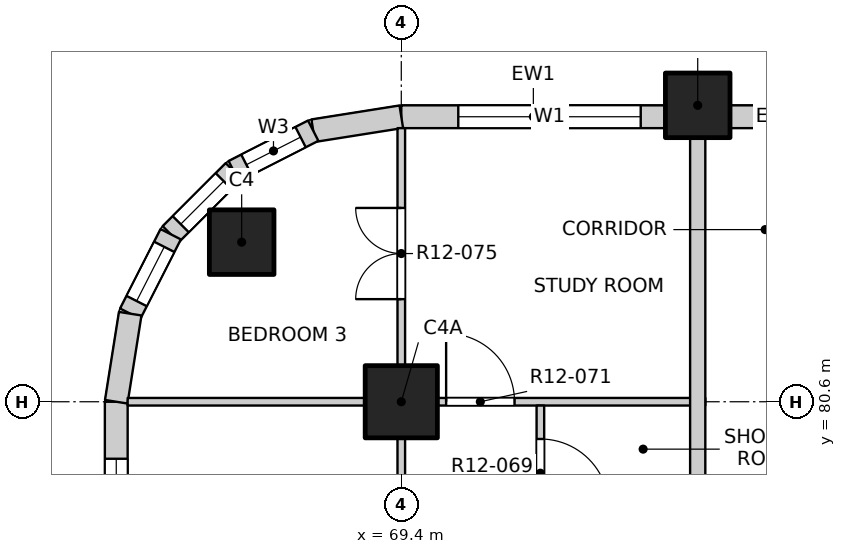
"""IFC4 building model, lengths in metres.
Left out: names, types, materials, properties, quantities, classifications, styles, units other than length and angle.
Written with IfcOpenShell. Run it as: python <this file> out.ifc"""

import sys

from ifc_helpers import new_model, si_unit, direction, frame, frame_2d, origin, origin_2d, place, context, subcontext, project, spatial, rectangle, extrude, element, fill, save


model = new_model("IFC4")
c1 = context("Model", 3, precision=1e-05, world=origin(), true_north=direction((0.0, 1.0)))
c2 = subcontext(c1, "Body", "Model", "MODEL_VIEW")
j1 = project(units=[si_unit("LENGTHUNIT", "METRE"), si_unit("PLANEANGLEUNIT", "RADIAN")], contexts=[c1])
p1 = place(None, origin())
s1 = spatial("IfcSite", under=j1, at=p1, CompositionType="ELEMENT")
p2 = place(p1, origin())
s2 = spatial("IfcBuilding", under=s1, at=p2, CompositionType="ELEMENT")
p3 = place(p2, frame((0.0, 0.0, 137.3)))
s3 = spatial("IfcBuildingStorey", under=s2, at=p3, CompositionType="ELEMENT", Elevation=137.3)
for number, where, z_axis, x_axis in (
    (1, (67.3, 82.7, -0.25), (0.0, 0.0, 1.0), (1.0, 0.0, 0.0)),
    (2, (73.3, 84.5, -0.25), (0.0, 0.0, 1.0), (1.0, 0.0, 0.0)),
):
    element("IfcColumn", number, at=place(p3, frame(where, z_axis=z_axis, x_axis=x_axis)), inside=s3, PredefinedType="COLUMN", context=c2, shape_type="SweptSolid", body=[
        extrude(rectangle(XDim=0.85, YDim=0.85, at=origin_2d()), origin(), (0.0, 0.0, 1.0), 3.4),
    ])
p4 = place(p3, frame((69.4, 80.6, -0.25), z_axis=(0.0, 0.0, 1.0), x_axis=(1.0, 0.0, 0.0)))
e3 = element("IfcColumn", 3, at=p4, inside=s3, PredefinedType="COLUMN", context=c2, shape_type="SweptSolid", body=[
    extrude(rectangle(XDim=0.95, YDim=0.95, at=origin_2d()), origin(), (0.0, 0.0, 1.0), 3.4),
])
p5 = place(p3, frame((69.4, 84.35, 0.0), z_axis=(0.0, 0.0, 1.0), x_axis=(1.0, 0.0, 0.0)))
e4 = element("IfcWall", 4, at=p5, inside=s3, PredefinedType="SOLIDWALL", context=c2, shape_type="SweptSolid", body=[
    extrude(rectangle(XDim=3.475, YDim=0.3, at=frame_2d((1.738, 0.0))), origin(), (0.0, 0.0, 1.0), 2.7),
])
p6 = place(p5, frame((0.75, 0.0, 0.9)))
e5 = element("IfcOpeningElement", 5, at=p6, cuts=e4, PredefinedType="OPENING", context=c2, shape_type="SweptSolid", body=[
    extrude(rectangle(XDim=2.4, YDim=1.8, at=frame_2d((1.2, 0.9))), frame((0.0, 0.16, 0.0), z_axis=(0.0, -1.0, 0.0), x_axis=(1.0, 0.0, 0.0)), (0.0, 0.0, 1.0), 0.32),
])
p7 = place(p3, frame((73.725, 84.35, 0.0), z_axis=(0.0, 0.0, 1.0), x_axis=(1.0, 0.0, 0.0)))
e6 = element("IfcWall", 6, at=p7, inside=s3, PredefinedType="SOLIDWALL", context=c2, shape_type="SweptSolid", body=[
    extrude(rectangle(XDim=1.25, YDim=0.3, at=frame_2d((0.625, 0.0))), origin(), (0.0, 0.0, 1.0), 2.7),
])
p8 = place(p3, frame((65.65, 77.125, 0.0), z_axis=(0.0, 0.0, 1.0), x_axis=(0.0, 1.0, 0.0)))
e7 = element("IfcWall", 7, at=p8, inside=s3, PredefinedType="SOLIDWALL", context=c2, shape_type="SweptSolid", body=[
    extrude(rectangle(XDim=3.475, YDim=0.3, at=frame_2d((1.738, 0.0))), origin(), (0.0, 0.0, 1.0), 2.7),
])
p9 = place(p8, frame((0.325, 0.0, 0.9)))
e8 = element("IfcOpeningElement", 8, at=p9, cuts=e7, PredefinedType="OPENING", context=c2, shape_type="SweptSolid", body=[
    extrude(rectangle(XDim=2.4, YDim=1.8, at=frame_2d((1.2, 0.9))), frame((0.0, 0.16, 0.0), z_axis=(0.0, -1.0, 0.0), x_axis=(1.0, 0.0, 0.0)), (0.0, 0.0, 1.0), 0.32),
])
p10 = place(p3, frame((69.4, 84.35, 0.0), z_axis=(0.0, 0.0, 1.0), x_axis=(-0.987678452879, -0.156496880861, 0.0)))
e9 = element("IfcWall", 9, at=p10, inside=s3, PredefinedType="SOLIDWALL", context=c2, shape_type="SweptSolid", body=[
    extrude(rectangle(XDim=1.173, YDim=0.3, at=frame_2d((0.586, 0.0))), origin(), (0.0, 0.0, 1.0), 2.7),
])
p11 = place(p3, frame((68.241, 84.167, 0.0), z_axis=(0.0, 0.0, 1.0), x_axis=(-0.890988677504, -0.454025524128, 0.0)))
e10 = element("IfcWall", 10, at=p11, inside=s3, PredefinedType="SOLIDWALL", context=c2, shape_type="SweptSolid", body=[
    extrude(rectangle(XDim=1.173, YDim=0.3, at=frame_2d((0.587, 0.0))), origin(), (0.0, 0.0, 1.0), 2.7),
])
p12 = place(p11, frame((0.187, 0.0, 0.9)))
e11 = element("IfcOpeningElement", 11, at=p12, cuts=e10, PredefinedType="OPENING", context=c2, shape_type="SweptSolid", body=[
    extrude(rectangle(XDim=0.8, YDim=1.2, at=frame_2d((0.4, 0.6))), frame((0.0, 0.16, 0.0), z_axis=(0.0, -1.0, 0.0), x_axis=(1.0, 0.0, 0.0)), (0.0, 0.0, 1.0), 0.32),
])
p13 = place(p3, frame((67.196, 83.634, 0.0), z_axis=(0.0, 0.0, 1.0), x_axis=(-0.707106781187, -0.707106781187, 0.0)))
e12 = element("IfcWall", 12, at=p13, inside=s3, PredefinedType="SOLIDWALL", context=c2, shape_type="SweptSolid", body=[
    extrude(rectangle(XDim=1.173, YDim=0.3, at=frame_2d((0.586, 0.0))), origin(), (0.0, 0.0, 1.0), 2.7),
])
p14 = place(p13, frame((0.187, 0.0, 0.9)))
e13 = element("IfcOpeningElement", 13, at=p14, cuts=e12, PredefinedType="OPENING", context=c2, shape_type="SweptSolid", body=[
    extrude(rectangle(XDim=0.8, YDim=1.2, at=frame_2d((0.4, 0.6))), frame((0.0, 0.16, 0.0), z_axis=(0.0, -1.0, 0.0), x_axis=(1.0, 0.0, 0.0)), (0.0, 0.0, 1.0), 0.32),
])
p15 = place(p3, frame((66.366, 82.804, 0.0), z_axis=(0.0, 0.0, 1.0), x_axis=(-0.454025524128, -0.890988677504, 0.0)))
e14 = element("IfcWall", 14, at=p15, inside=s3, PredefinedType="SOLIDWALL", context=c2, shape_type="SweptSolid", body=[
    extrude(rectangle(XDim=1.173, YDim=0.3, at=frame_2d((0.587, 0.0))), origin(), (0.0, 0.0, 1.0), 2.7),
])
p16 = place(p15, frame((0.187, 0.0, 0.9)))
e15 = element("IfcOpeningElement", 15, at=p16, cuts=e14, PredefinedType="OPENING", context=c2, shape_type="SweptSolid", body=[
    extrude(rectangle(XDim=0.8, YDim=1.2, at=frame_2d((0.4, 0.6))), frame((0.0, 0.16, 0.0), z_axis=(0.0, -1.0, 0.0), x_axis=(1.0, 0.0, 0.0)), (0.0, 0.0, 1.0), 0.32),
])
p17 = place(p3, frame((65.833, 81.759, 0.0), z_axis=(0.0, 0.0, 1.0), x_axis=(-0.156496880861, -0.987678452879, 0.0)))
e16 = element("IfcWall", 16, at=p17, inside=s3, PredefinedType="SOLIDWALL", context=c2, shape_type="SweptSolid", body=[
    extrude(rectangle(XDim=1.173, YDim=0.3, at=frame_2d((0.586, 0.0))), origin(), (0.0, 0.0, 1.0), 2.7),
])
p18 = place(p3, frame((65.8, 80.6, 0.0), z_axis=(0.0, 0.0, 1.0), x_axis=(1.0, 0.0, 0.0)))
e17 = element("IfcWall", 17, at=p18, inside=s3, PredefinedType="PARTITIONING", context=c2, shape_type="SweptSolid", body=[
    extrude(rectangle(XDim=7.6, YDim=0.1, at=frame_2d((3.8, 0.0))), origin(), (0.0, 0.0, 1.0), 3.15),
])
p19 = place(p18, frame((4.19, 0.0, 0.0)))
e18 = element("IfcOpeningElement", 18, at=p19, cuts=e17, PredefinedType="OPENING", context=c2, shape_type="SweptSolid", body=[
    extrude(rectangle(XDim=0.9, YDim=2.1, at=frame_2d((0.45, 1.05))), frame((0.0, 0.06, 0.0), z_axis=(0.0, -1.0, 0.0), x_axis=(1.0, 0.0, 0.0)), (0.0, 0.0, 1.0), 0.12),
])
p20 = place(p3, frame((69.4, 45.8, 0.0), z_axis=(0.0, 0.0, 1.0), x_axis=(0.0, 1.0, 0.0)))
e19 = element("IfcWall", 19, at=p20, inside=s3, PredefinedType="PARTITIONING", context=c2, shape_type="SweptSolid", body=[
    extrude(rectangle(XDim=38.4, YDim=0.1, at=frame_2d((19.2, 0.0))), origin(), (0.0, 0.0, 1.0), 3.15),
])
p21 = place(p20, frame((1.05, 0.0, 0.0)))
e20 = element("IfcOpeningElement", 20, at=p21, cuts=e19, PredefinedType="OPENING", context=c2, shape_type="SweptSolid", body=[
    extrude(rectangle(XDim=1.2, YDim=2.1, at=frame_2d((0.6, 1.05))), frame((0.0, 0.06, 0.0), z_axis=(0.0, -1.0, 0.0), x_axis=(1.0, 0.0, 0.0)), (0.0, 0.0, 1.0), 0.12),
])
p22 = place(p20, frame((5.1, 0.0, 0.0)))
e21 = element("IfcOpeningElement", 21, at=p22, cuts=e19, PredefinedType="OPENING", context=c2, shape_type="SweptSolid", body=[
    extrude(rectangle(XDim=0.9, YDim=2.1, at=frame_2d((0.45, 1.05))), frame((0.0, 0.06, 0.0), z_axis=(0.0, -1.0, 0.0), x_axis=(1.0, 0.0, 0.0)), (0.0, 0.0, 1.0), 0.12),
])
p23 = place(p20, frame((9.0, 0.0, 0.0)))
e22 = element("IfcOpeningElement", 22, at=p23, cuts=e19, PredefinedType="OPENING", context=c2, shape_type="SweptSolid", body=[
    extrude(rectangle(XDim=0.9, YDim=2.1, at=frame_2d((0.45, 1.05))), frame((0.0, 0.06, 0.0), z_axis=(0.0, -1.0, 0.0), x_axis=(1.0, 0.0, 0.0)), (0.0, 0.0, 1.0), 0.12),
])
p24 = place(p20, frame((12.9, 0.0, 0.0)))
e23 = element("IfcOpeningElement", 23, at=p24, cuts=e19, PredefinedType="OPENING", context=c2, shape_type="SweptSolid", body=[
    extrude(rectangle(XDim=0.9, YDim=2.1, at=frame_2d((0.45, 1.05))), frame((0.0, 0.06, 0.0), z_axis=(0.0, -1.0, 0.0), x_axis=(1.0, 0.0, 0.0)), (0.0, 0.0, 1.0), 0.12),
])
p25 = place(p20, frame((16.8, 0.0, 0.0)))
e24 = element("IfcOpeningElement", 24, at=p25, cuts=e19, PredefinedType="OPENING", context=c2, shape_type="SweptSolid", body=[
    extrude(rectangle(XDim=0.9, YDim=2.1, at=frame_2d((0.45, 1.05))), frame((0.0, 0.06, 0.0), z_axis=(0.0, -1.0, 0.0), x_axis=(1.0, 0.0, 0.0)), (0.0, 0.0, 1.0), 0.12),
])
p26 = place(p20, frame((20.7, 0.0, 0.0)))
e25 = element("IfcOpeningElement", 25, at=p26, cuts=e19, PredefinedType="OPENING", context=c2, shape_type="SweptSolid", body=[
    extrude(rectangle(XDim=0.9, YDim=2.1, at=frame_2d((0.45, 1.05))), frame((0.0, 0.06, 0.0), z_axis=(0.0, -1.0, 0.0), x_axis=(1.0, 0.0, 0.0)), (0.0, 0.0, 1.0), 0.12),
])
p27 = place(p20, frame((24.6, 0.0, 0.0)))
e26 = element("IfcOpeningElement", 26, at=p27, cuts=e19, PredefinedType="OPENING", context=c2, shape_type="SweptSolid", body=[
    extrude(rectangle(XDim=0.9, YDim=2.1, at=frame_2d((0.45, 1.05))), frame((0.0, 0.06, 0.0), z_axis=(0.0, -1.0, 0.0), x_axis=(1.0, 0.0, 0.0)), (0.0, 0.0, 1.0), 0.12),
])
p28 = place(p20, frame((28.5, 0.0, 0.0)))
e27 = element("IfcOpeningElement", 27, at=p28, cuts=e19, PredefinedType="OPENING", context=c2, shape_type="SweptSolid", body=[
    extrude(rectangle(XDim=0.9, YDim=2.1, at=frame_2d((0.45, 1.05))), frame((0.0, 0.06, 0.0), z_axis=(0.0, -1.0, 0.0), x_axis=(1.0, 0.0, 0.0)), (0.0, 0.0, 1.0), 0.12),
])
p29 = place(p20, frame((32.4, 0.0, 0.0)))
e28 = element("IfcOpeningElement", 28, at=p29, cuts=e19, PredefinedType="OPENING", context=c2, shape_type="SweptSolid", body=[
    extrude(rectangle(XDim=0.9, YDim=2.1, at=frame_2d((0.45, 1.05))), frame((0.0, 0.06, 0.0), z_axis=(0.0, -1.0, 0.0), x_axis=(1.0, 0.0, 0.0)), (0.0, 0.0, 1.0), 0.12),
])
p30 = place(p20, frame((36.15, 0.0, 0.0)))
e29 = element("IfcOpeningElement", 29, at=p30, cuts=e19, PredefinedType="OPENING", context=c2, shape_type="SweptSolid", body=[
    extrude(rectangle(XDim=1.2, YDim=2.1, at=frame_2d((0.6, 1.05))), frame((0.0, 0.06, 0.0), z_axis=(0.0, -1.0, 0.0), x_axis=(1.0, 0.0, 0.0)), (0.0, 0.0, 1.0), 0.12),
])
p31 = place(p3, frame((71.23, 67.5, 0.0), z_axis=(0.0, 0.0, 1.0), x_axis=(0.0, 1.0, 0.0)))
e30 = element("IfcWall", 30, at=p31, inside=s3, PredefinedType="PARTITIONING", context=c2, shape_type="SweptSolid", body=[
    extrude(rectangle(XDim=13.05, YDim=0.1, at=frame_2d((6.525, 0.0))), origin(), (0.0, 0.0, 1.0), 3.15),
])
p32 = place(p31, frame((0.925, 0.0, 0.0)))
e31 = element("IfcOpeningElement", 31, at=p32, cuts=e30, PredefinedType="OPENING", context=c2, shape_type="SweptSolid", body=[
    extrude(rectangle(XDim=0.8, YDim=2.1, at=frame_2d((0.4, 1.05))), frame((0.0, 0.06, 0.0), z_axis=(0.0, -1.0, 0.0), x_axis=(1.0, 0.0, 0.0)), (0.0, 0.0, 1.0), 0.12),
])
p33 = place(p31, frame((3.675, 0.0, 0.0)))
e32 = element("IfcOpeningElement", 32, at=p33, cuts=e30, PredefinedType="OPENING", context=c2, shape_type="SweptSolid", body=[
    extrude(rectangle(XDim=0.8, YDim=2.1, at=frame_2d((0.4, 1.05))), frame((0.0, 0.06, 0.0), z_axis=(0.0, -1.0, 0.0), x_axis=(1.0, 0.0, 0.0)), (0.0, 0.0, 1.0), 0.12),
])
p34 = place(p31, frame((6.685, 0.0, 0.0)))
e33 = element("IfcOpeningElement", 33, at=p34, cuts=e30, PredefinedType="OPENING", context=c2, shape_type="SweptSolid", body=[
    extrude(rectangle(XDim=0.9, YDim=2.1, at=frame_2d((0.45, 1.05))), frame((0.0, 0.06, 0.0), z_axis=(0.0, -1.0, 0.0), x_axis=(1.0, 0.0, 0.0)), (0.0, 0.0, 1.0), 0.12),
])
p35 = place(p31, frame((9.57, 0.0, 0.0)))
e34 = element("IfcOpeningElement", 34, at=p35, cuts=e30, PredefinedType="OPENING", context=c2, shape_type="SweptSolid", body=[
    extrude(rectangle(XDim=0.9, YDim=2.1, at=frame_2d((0.45, 1.05))), frame((0.0, 0.06, 0.0), z_axis=(0.0, -1.0, 0.0), x_axis=(1.0, 0.0, 0.0)), (0.0, 0.0, 1.0), 0.12),
])
p36 = place(p31, frame((11.71, 0.0, 0.0)))
e35 = element("IfcOpeningElement", 35, at=p36, cuts=e30, PredefinedType="OPENING", context=c2, shape_type="SweptSolid", body=[
    extrude(rectangle(XDim=0.9, YDim=2.1, at=frame_2d((0.45, 1.05))), frame((0.0, 0.06, 0.0), z_axis=(0.0, -1.0, 0.0), x_axis=(1.0, 0.0, 0.0)), (0.0, 0.0, 1.0), 0.12),
])
p37 = place(p3, frame((73.3, 49.5, 0.0), z_axis=(0.0, 0.0, 1.0), x_axis=(0.0, 1.0, 0.0)))
e36 = element("IfcWall", 36, at=p37, inside=s3, PredefinedType="PARTITIONING", context=c2, shape_type="SweptSolid", body=[
    extrude(rectangle(XDim=34.7, YDim=0.2, at=frame_2d((17.35, 0.0))), origin(), (0.0, 0.0, 1.0), 3.15),
])
p38 = place(p37, frame((6.975, 0.0, 0.0)))
e37 = element("IfcOpeningElement", 37, at=p38, cuts=e36, PredefinedType="OPENING", context=c2, shape_type="SweptSolid", body=[
    extrude(rectangle(XDim=1.0, YDim=2.1, at=frame_2d((0.5, 1.05))), frame((0.0, 0.11, 0.0), z_axis=(0.0, -1.0, 0.0), x_axis=(1.0, 0.0, 0.0)), (0.0, 0.0, 1.0), 0.22),
])
p39 = place(p37, frame((18.125, 0.0, 0.0)))
e38 = element("IfcOpeningElement", 38, at=p39, cuts=e36, PredefinedType="OPENING", context=c2, shape_type="SweptSolid", body=[
    extrude(rectangle(XDim=1.0, YDim=2.1, at=frame_2d((0.5, 1.05))), frame((0.0, 0.11, 0.0), z_axis=(0.0, -1.0, 0.0), x_axis=(1.0, 0.0, 0.0)), (0.0, 0.0, 1.0), 0.22),
])
p40 = place(p6, origin())
e39 = element("IfcWindow", 39, at=p40, inside=s3, PartitioningType="DOUBLE_PANEL_VERTICAL", PredefinedType="WINDOW", context=c2, shape_type="SweptSolid", body=[
    extrude(rectangle(XDim=2.4, YDim=1.8, at=frame_2d((1.2, 0.9))), frame((0.0, 0.03, 0.0), z_axis=(0.0, -1.0, 0.0), x_axis=(1.0, 0.0, 0.0)), (0.0, 0.0, 1.0), 0.06),
])
fill(e5, e39)
p41 = place(p9, origin())
e40 = element("IfcWindow", 40, at=p41, inside=s3, PartitioningType="DOUBLE_PANEL_VERTICAL", PredefinedType="WINDOW", context=c2, shape_type="SweptSolid", body=[
    extrude(rectangle(XDim=2.4, YDim=1.8, at=frame_2d((1.2, 0.9))), frame((0.0, 0.03, 0.0), z_axis=(0.0, -1.0, 0.0), x_axis=(1.0, 0.0, 0.0)), (0.0, 0.0, 1.0), 0.06),
])
fill(e8, e40)
p42 = place(p12, origin())
e41 = element("IfcWindow", 41, at=p42, inside=s3, PartitioningType="SINGLE_PANEL", PredefinedType="WINDOW", context=c2, shape_type="SweptSolid", body=[
    extrude(rectangle(XDim=0.8, YDim=1.2, at=frame_2d((0.4, 0.6))), frame((0.0, 0.03, 0.0), z_axis=(0.0, -1.0, 0.0), x_axis=(1.0, 0.0, 0.0)), (0.0, 0.0, 1.0), 0.06),
])
fill(e11, e41)
p43 = place(p14, origin())
e42 = element("IfcWindow", 42, at=p43, inside=s3, PartitioningType="SINGLE_PANEL", PredefinedType="WINDOW", context=c2, shape_type="SweptSolid", body=[
    extrude(rectangle(XDim=0.8, YDim=1.2, at=frame_2d((0.4, 0.6))), frame((0.0, 0.03, 0.0), z_axis=(0.0, -1.0, 0.0), x_axis=(1.0, 0.0, 0.0)), (0.0, 0.0, 1.0), 0.06),
])
fill(e13, e42)
p44 = place(p16, origin())
e43 = element("IfcWindow", 43, at=p44, inside=s3, PartitioningType="SINGLE_PANEL", PredefinedType="WINDOW", context=c2, shape_type="SweptSolid", body=[
    extrude(rectangle(XDim=0.8, YDim=1.2, at=frame_2d((0.4, 0.6))), frame((0.0, 0.03, 0.0), z_axis=(0.0, -1.0, 0.0), x_axis=(1.0, 0.0, 0.0)), (0.0, 0.0, 1.0), 0.06),
])
fill(e15, e43)
p45 = place(p36, origin())
e44 = element("IfcDoor", 44, at=p45, inside=s3, OperationType="SINGLE_SWING_RIGHT", PredefinedType="DOOR", context=c2, shape_type="SweptSolid", body=[
    extrude(rectangle(XDim=0.9, YDim=2.1, at=frame_2d((0.45, 1.05))), frame((0.0, 0.025, 0.0), z_axis=(0.0, -1.0, 0.0), x_axis=(1.0, 0.0, 0.0)), (0.0, 0.0, 1.0), 0.05),
])
fill(e35, e44)
p46 = place(p19, origin())
e45 = element("IfcDoor", 45, at=p46, inside=s3, OperationType="SINGLE_SWING_LEFT", PredefinedType="DOOR", context=c2, shape_type="SweptSolid", body=[
    extrude(rectangle(XDim=0.9, YDim=2.1, at=frame_2d((0.45, 1.05))), frame((0.0, 0.025, 0.0), z_axis=(0.0, -1.0, 0.0), x_axis=(1.0, 0.0, 0.0)), (0.0, 0.0, 1.0), 0.05),
])
fill(e18, e45)
p47 = place(p30, origin())
e46 = element("IfcDoor", 46, at=p47, inside=s3, OperationType="DOUBLE_DOOR_SINGLE_SWING", PredefinedType="DOOR", context=c2, shape_type="SweptSolid", body=[
    extrude(rectangle(XDim=1.2, YDim=2.1, at=frame_2d((0.6, 1.05))), frame((0.0, 0.025, 0.0), z_axis=(0.0, -1.0, 0.0), x_axis=(1.0, 0.0, 0.0)), (0.0, 0.0, 1.0), 0.05),
])
fill(e29, e46)
save(model, sys.argv[1])
